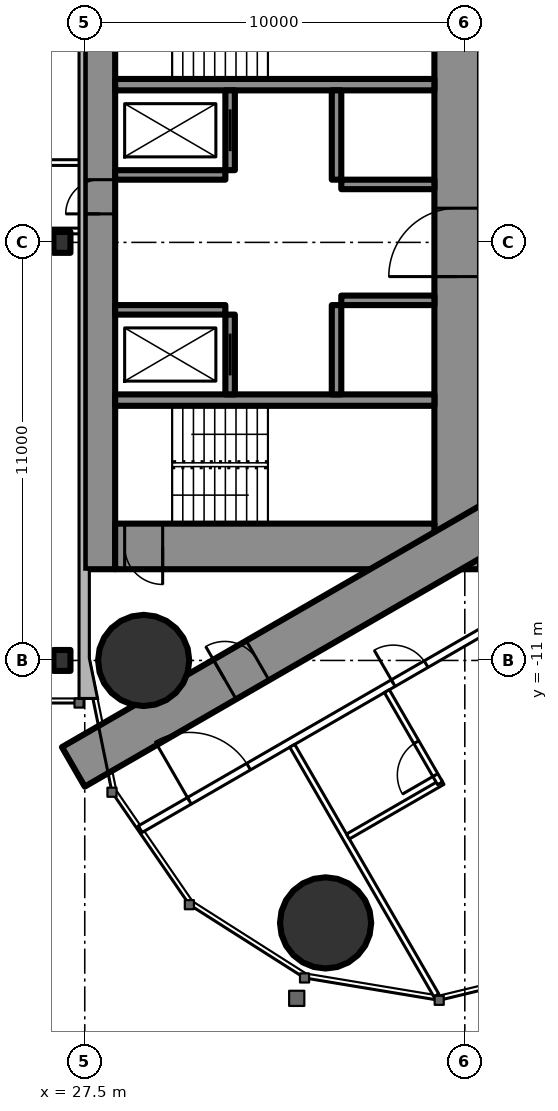
"""IFC4 building model, lengths in metres.
Left out: names, types, materials, properties, quantities, classifications, styles, units other than length and angle.
Written with IfcOpenShell. Run it as: python <this file> out.ifc"""

import sys

from ifc_helpers import new_model, si_unit, direction, frame, frame_2d, origin, origin_2d, place, context, subcontext, project, spatial, rectangle, circle, i_section, extrude, element, fill, save


model = new_model("IFC4")
c1 = context("Model", 3, precision=1e-05, world=origin(), true_north=direction((0.0, 1.0)))
c2 = subcontext(c1, "Body", "Model", "MODEL_VIEW")
j1 = project(units=[si_unit("LENGTHUNIT", "METRE"), si_unit("PLANEANGLEUNIT", "RADIAN")], contexts=[c1])
p1 = place(None, origin())
s1 = spatial("IfcSite", under=j1, at=p1, CompositionType="ELEMENT")
p2 = place(p1, origin())
s2 = spatial("IfcBuilding", under=s1, at=p2, CompositionType="ELEMENT")
p3 = place(p2, frame((0.0, 0.0, 240.5)))
s3 = spatial("IfcBuildingStorey", under=s2, at=p3, CompositionType="ELEMENT", Elevation=240.5)
for number, where, z_axis, x_axis in (
    (1, (33.837, -17.906, 0.0), (0.0, 0.0, 1.0), (1.0, 0.0, 0.0)),
    (2, (29.05, -11.0, 0.0), (0.0, 0.0, 1.0), (1.0, 0.0, 0.0)),
):
    element("IfcColumn", number, at=place(p3, frame(where, z_axis=z_axis, x_axis=x_axis)), inside=s3, PredefinedType="COLUMN", context=c2, shape_type="SweptSolid", body=[
        extrude(circle(Radius=1.2, at=origin_2d()), origin(), (0.0, 0.0, 1.0), 3.6),
    ])
p4 = place(p3, frame((27.9, -8.6, 0.0), z_axis=(0.0, 0.0, 1.0), x_axis=(0.0, 1.0, 0.0)))
e3 = element("IfcWall", 3, at=p4, inside=s3, PredefinedType="SHEAR", context=c2, shape_type="SweptSolid", body=[
    extrude(rectangle(XDim=17.2, YDim=0.8, at=frame_2d((8.6, 0.0))), origin(), (0.0, 0.0, 1.0), 3.6),
])
p5 = place(p4, frame((9.35, 0.0, 0.0)))
e4 = element("IfcOpeningElement", 4, at=p5, cuts=e3, PredefinedType="OPENING", context=c2, shape_type="SweptSolid", body=[
    extrude(rectangle(XDim=0.9, YDim=2.2, at=frame_2d((0.45, 1.1))), frame((0.0, 0.41, 0.0), z_axis=(0.0, -1.0, 0.0), x_axis=(1.0, 0.0, 0.0)), (0.0, 0.0, 1.0), 0.82),
])
p6 = place(p3, frame((37.3, -8.6, 0.0), z_axis=(0.0, 0.0, 1.0), x_axis=(0.0, 1.0, 0.0)))
e5 = element("IfcWall", 5, at=p6, inside=s3, PredefinedType="SHEAR", context=c2, shape_type="SweptSolid", body=[
    extrude(rectangle(XDim=17.2, YDim=1.2, at=frame_2d((8.6, 0.0))), origin(), (0.0, 0.0, 1.0), 3.6),
])
p7 = place(p6, frame((7.7, 0.0, 0.0)))
e6 = element("IfcOpeningElement", 6, at=p7, cuts=e5, PredefinedType="OPENING", context=c2, shape_type="SweptSolid", body=[
    extrude(rectangle(XDim=1.8, YDim=2.2, at=frame_2d((0.9, 1.1))), frame((0.0, 0.61, 0.0), z_axis=(0.0, -1.0, 0.0), x_axis=(1.0, 0.0, 0.0)), (0.0, 0.0, 1.0), 1.22),
])
p8 = place(p3, frame((28.3, -8.0, 0.0), z_axis=(0.0, 0.0, 1.0), x_axis=(1.0, 0.0, 0.0)))
e7 = element("IfcWall", 7, at=p8, inside=s3, PredefinedType="SHEAR", context=c2, shape_type="SweptSolid", body=[
    extrude(rectangle(XDim=8.4, YDim=1.2, at=frame_2d((4.2, 0.0))), origin(), (0.0, 0.0, 1.0), 3.6),
])
p9 = place(p8, frame((0.25, 0.0, 0.0)))
e8 = element("IfcOpeningElement", 8, at=p9, cuts=e7, PredefinedType="OPENING", context=c2, shape_type="SweptSolid", body=[
    extrude(rectangle(XDim=1.0, YDim=2.2, at=frame_2d((0.5, 1.1))), frame((0.0, 0.61, 0.0), z_axis=(0.0, -1.0, 0.0), x_axis=(1.0, 0.0, 0.0)), (0.0, 0.0, 1.0), 1.22),
])
for number, where, z_axis, x_axis in (
    (9, (28.3, -4.15, 0.0), (0.0, 0.0, 1.0), (1.0, 0.0, 0.0)),
    (10, (28.3, 4.15, 0.0), (0.0, 0.0, 1.0), (1.0, 0.0, 0.0)),
):
    element("IfcWall", number, at=place(p3, frame(where, z_axis=z_axis, x_axis=x_axis)), inside=s3, PredefinedType="SHEAR", context=c2, shape_type="SweptSolid", body=[
        extrude(rectangle(XDim=8.4, YDim=0.3, at=frame_2d((4.2, 0.0))), origin(), (0.0, 0.0, 1.0), 3.6),
    ])
p10 = place(p3, frame((31.325, -4.0, 0.0), z_axis=(0.0, 0.0, 1.0), x_axis=(0.0, 1.0, 0.0)))
e11 = element("IfcWall", 11, at=p10, inside=s3, PredefinedType="SHEAR", context=c2, shape_type="SweptSolid", body=[
    extrude(rectangle(XDim=2.1, YDim=0.25, at=frame_2d((1.05, 0.0))), origin(), (0.0, 0.0, 1.0), 3.6),
])
p11 = place(p10, frame((0.5, 0.0, 0.0)))
e12 = element("IfcOpeningElement", 12, at=p11, cuts=e11, PredefinedType="OPENING", context=c2, shape_type="SweptSolid", body=[
    extrude(rectangle(XDim=1.1, YDim=2.2, at=frame_2d((0.55, 1.1))), frame((0.0, 0.135, 0.0), z_axis=(0.0, -1.0, 0.0), x_axis=(1.0, 0.0, 0.0)), (0.0, 0.0, 1.0), 0.27),
])
p12 = place(p3, frame((34.125, -4.0, 0.0), z_axis=(0.0, 0.0, 1.0), x_axis=(0.0, 1.0, 0.0)))
e13 = element("IfcWall", 13, at=p12, inside=s3, PredefinedType="SHEAR", context=c2, shape_type="SweptSolid", body=[
    extrude(rectangle(XDim=2.35, YDim=0.25, at=frame_2d((1.175, 0.0))), origin(), (0.0, 0.0, 1.0), 3.6),
])
p13 = place(p3, frame((28.3, -1.775, 0.0), z_axis=(0.0, 0.0, 1.0), x_axis=(1.0, 0.0, 0.0)))
e14 = element("IfcWall", 14, at=p13, inside=s3, PredefinedType="SHEAR", context=c2, shape_type="SweptSolid", body=[
    extrude(rectangle(XDim=2.9, YDim=0.25, at=frame_2d((1.45, 0.0))), origin(), (0.0, 0.0, 1.0), 3.6),
])
p14 = place(p3, frame((34.25, -1.525, 0.0), z_axis=(0.0, 0.0, 1.0), x_axis=(1.0, 0.0, 0.0)))
e15 = element("IfcWall", 15, at=p14, inside=s3, PredefinedType="SHEAR", context=c2, shape_type="SweptSolid", body=[
    extrude(rectangle(XDim=2.45, YDim=0.25, at=frame_2d((1.225, 0.0))), origin(), (0.0, 0.0, 1.0), 3.6),
])
p15 = place(p3, frame((31.325, 1.9, 0.0), z_axis=(0.0, 0.0, 1.0), x_axis=(0.0, 1.0, 0.0)))
e16 = element("IfcWall", 16, at=p15, inside=s3, PredefinedType="SHEAR", context=c2, shape_type="SweptSolid", body=[
    extrude(rectangle(XDim=2.1, YDim=0.25, at=frame_2d((1.05, 0.0))), origin(), (0.0, 0.0, 1.0), 3.6),
])
p16 = place(p15, frame((0.5, 0.0, 0.0)))
e17 = element("IfcOpeningElement", 17, at=p16, cuts=e16, PredefinedType="OPENING", context=c2, shape_type="SweptSolid", body=[
    extrude(rectangle(XDim=1.1, YDim=2.2, at=frame_2d((0.55, 1.1))), frame((0.0, 0.135, 0.0), z_axis=(0.0, -1.0, 0.0), x_axis=(1.0, 0.0, 0.0)), (0.0, 0.0, 1.0), 0.27),
])
p17 = place(p3, frame((34.125, 1.65, 0.0), z_axis=(0.0, 0.0, 1.0), x_axis=(0.0, 1.0, 0.0)))
e18 = element("IfcWall", 18, at=p17, inside=s3, PredefinedType="SHEAR", context=c2, shape_type="SweptSolid", body=[
    extrude(rectangle(XDim=2.35, YDim=0.25, at=frame_2d((1.175, 0.0))), origin(), (0.0, 0.0, 1.0), 3.6),
])
p18 = place(p3, frame((28.3, 1.775, 0.0), z_axis=(0.0, 0.0, 1.0), x_axis=(1.0, 0.0, 0.0)))
e19 = element("IfcWall", 19, at=p18, inside=s3, PredefinedType="SHEAR", context=c2, shape_type="SweptSolid", body=[
    extrude(rectangle(XDim=2.9, YDim=0.25, at=frame_2d((1.45, 0.0))), origin(), (0.0, 0.0, 1.0), 3.6),
])
p19 = place(p3, frame((34.25, 1.525, 0.0), z_axis=(0.0, 0.0, 1.0), x_axis=(1.0, 0.0, 0.0)))
e20 = element("IfcWall", 20, at=p19, inside=s3, PredefinedType="SHEAR", context=c2, shape_type="SweptSolid", body=[
    extrude(rectangle(XDim=2.45, YDim=0.25, at=frame_2d((1.225, 0.0))), origin(), (0.0, 0.0, 1.0), 3.6),
])
p20 = place(p3, frame((27.2, -13.8, 0.0), z_axis=(0.0, 0.0, 1.0), x_axis=(0.866027159892, 0.499996958321, 0.0)))
e21 = element("IfcWall", 21, at=p20, inside=s3, PredefinedType="SHEAR", context=c2, shape_type="SweptSolid", body=[
    extrude(rectangle(XDim=27.947, YDim=1.2, at=frame_2d((13.973, 0.0))), origin(), (0.0, 0.0, 1.0), 3.6),
])
p21 = place(p20, frame((4.6, 0.0, 0.0)))
e22 = element("IfcOpeningElement", 22, at=p21, cuts=e21, PredefinedType="OPENING", context=c2, shape_type="SweptSolid", body=[
    extrude(rectangle(XDim=1.0, YDim=2.2, at=frame_2d((0.5, 1.1))), frame((0.0, 0.61, 0.0), z_axis=(0.0, -1.0, 0.0), x_axis=(1.0, 0.0, 0.0)), (0.0, 0.0, 1.0), 1.22),
])
p22 = place(p20, frame((13.395, 0.0, 0.0)))
e23 = element("IfcOpeningElement", 23, at=p22, cuts=e21, PredefinedType="OPENING", context=c2, shape_type="SweptSolid", body=[
    extrude(rectangle(XDim=1.8, YDim=2.2, at=frame_2d((0.9, 1.1))), frame((0.0, 0.61, 0.0), z_axis=(0.0, -1.0, 0.0), x_axis=(1.0, 0.0, 0.0)), (0.0, 0.0, 1.0), 1.22),
])
p23 = place(p3, frame((27.2, 13.8, 0.0), z_axis=(0.0, 0.0, 1.0), x_axis=(0.866024515034, -0.500001539357, 0.0)))
e24 = element("IfcWall", 24, at=p23, inside=s3, PredefinedType="SHEAR", context=c2, shape_type="SweptSolid", body=[
    extrude(rectangle(XDim=26.907, YDim=1.2, at=frame_2d((13.454, 0.0))), origin(), (0.0, 0.0, 1.0), 3.6),
])
p24 = place(p23, frame((4.6, 0.0, 0.0)))
e25 = element("IfcOpeningElement", 25, at=p24, cuts=e24, PredefinedType="OPENING", context=c2, shape_type="SweptSolid", body=[
    extrude(rectangle(XDim=1.0, YDim=2.2, at=frame_2d((0.5, 1.1))), frame((0.0, 0.61, 0.0), z_axis=(0.0, -1.0, 0.0), x_axis=(1.0, 0.0, 0.0)), (0.0, 0.0, 1.0), 1.22),
])
p25 = place(p23, frame((13.395, 0.0, 0.0)))
e26 = element("IfcOpeningElement", 26, at=p25, cuts=e24, PredefinedType="OPENING", context=c2, shape_type="SweptSolid", body=[
    extrude(rectangle(XDim=1.8, YDim=2.2, at=frame_2d((0.9, 1.1))), frame((0.0, 0.61, 0.0), z_axis=(0.0, -1.0, 0.0), x_axis=(1.0, 0.0, 0.0)), (0.0, 0.0, 1.0), 1.22),
])
for number, where, z_axis, x_axis in (
    (27, (26.9, -11.0, 0.0), (0.0, 0.0, 1.0), (1.0, 0.0, 0.0)),
    (28, (26.9, 0.0, 0.0), (0.0, 0.0, 1.0), (1.0, 0.0, 0.0)),
):
    element("IfcColumn", number, at=place(p3, frame(where, z_axis=z_axis, x_axis=x_axis)), inside=s3, PredefinedType="COLUMN", context=c2, shape_type="SweptSolid", body=[
        extrude(i_section(OverallWidth=0.448, OverallDepth=0.55, WebThickness=0.072, FlangeThickness=0.115, FilletRadius=0.02, at=origin_2d()), origin(), (0.0, 0.0, 1.0), 3.6),
    ])
p26 = place(p3, frame((28.959, -15.44, 0.0), z_axis=(0.0, 0.0, 1.0), x_axis=(0.866025227435, 0.500000305447, 0.0)))
e29 = element("IfcWall", 29, at=p26, inside=s3, PredefinedType="PARTITIONING", context=c2, shape_type="SweptSolid", body=[
    extrude(rectangle(XDim=30.88, YDim=0.2, at=frame_2d((15.44, 0.0))), origin(), (0.0, 0.0, 1.0), 3.35),
])
p27 = place(p26, frame((1.494, 0.0, 0.0)))
e30 = element("IfcOpeningElement", 30, at=p27, cuts=e29, PredefinedType="OPENING", context=c2, shape_type="SweptSolid", body=[
    extrude(rectangle(XDim=1.8, YDim=2.03, at=frame_2d((0.9, 1.015))), frame((0.0, 0.11, 0.0), z_axis=(0.0, -1.0, 0.0), x_axis=(1.0, 0.0, 0.0)), (0.0, 0.0, 1.0), 0.22),
])
p28 = place(p26, frame((7.687, 0.0, 0.0)))
e31 = element("IfcOpeningElement", 31, at=p28, cuts=e29, PredefinedType="OPENING", context=c2, shape_type="SweptSolid", body=[
    extrude(rectangle(XDim=1.0, YDim=2.2, at=frame_2d((0.5, 1.1))), frame((0.0, 0.11, 0.0), z_axis=(0.0, -1.0, 0.0), x_axis=(1.0, 0.0, 0.0)), (0.0, 0.0, 1.0), 0.22),
])
p29 = place(p26, frame((16.137, 0.0, 0.0)))
e32 = element("IfcOpeningElement", 32, at=p29, cuts=e29, PredefinedType="OPENING", context=c2, shape_type="SweptSolid", body=[
    extrude(rectangle(XDim=0.95, YDim=2.2, at=frame_2d((0.475, 1.1))), frame((0.0, 0.11, 0.0), z_axis=(0.0, -1.0, 0.0), x_axis=(1.0, 0.0, 0.0)), (0.0, 0.0, 1.0), 0.22),
])
p30 = place(p26, frame((20.021, 0.0, 0.0)))
e33 = element("IfcOpeningElement", 33, at=p30, cuts=e29, PredefinedType="OPENING", context=c2, shape_type="SweptSolid", body=[
    extrude(rectangle(XDim=0.95, YDim=2.2, at=frame_2d((0.475, 1.1))), frame((0.0, 0.11, 0.0), z_axis=(0.0, -1.0, 0.0), x_axis=(1.0, 0.0, 0.0)), (0.0, 0.0, 1.0), 0.22),
])
p31 = place(p26, frame((26.253, 0.0, 0.0)))
e34 = element("IfcOpeningElement", 34, at=p31, cuts=e29, PredefinedType="OPENING", context=c2, shape_type="SweptSolid", body=[
    extrude(rectangle(XDim=0.95, YDim=2.2, at=frame_2d((0.475, 1.1))), frame((0.0, 0.11, 0.0), z_axis=(0.0, -1.0, 0.0), x_axis=(1.0, 0.0, 0.0)), (0.0, 0.0, 1.0), 0.22),
])
p32 = place(p3, frame((32.96, -13.246, 0.0), z_axis=(0.0, 0.0, 1.0), x_axis=(0.500000236886, -0.866025267018, 0.0)))
e35 = element("IfcWall", 35, at=p32, inside=s3, PredefinedType="PARTITIONING", context=c2, shape_type="SweptSolid", body=[
    extrude(rectangle(XDim=7.583, YDim=0.15, at=frame_2d((3.791, 0.0))), origin(), (0.0, 0.0, 1.0), 3.35),
])
p33 = place(p3, frame((34.425, -15.633, 0.0), z_axis=(0.0, 0.0, 1.0), x_axis=(0.866018712932, 0.500011588718, 0.0)))
e36 = element("IfcWall", 36, at=p33, inside=s3, PredefinedType="PARTITIONING", context=c2, shape_type="SweptSolid", body=[
    extrude(rectangle(XDim=2.875, YDim=0.15, at=frame_2d((1.438, 0.0))), origin(), (0.0, 0.0, 1.0), 3.35),
])
p34 = place(p3, frame((35.45, -11.808, 0.0), z_axis=(0.0, 0.0, 1.0), x_axis=(0.49994636267, -0.866056369097, 0.0)))
e37 = element("IfcWall", 37, at=p34, inside=s3, PredefinedType="PARTITIONING", context=c2, shape_type="SweptSolid", body=[
    extrude(rectangle(XDim=2.8, YDim=0.15, at=frame_2d((1.4, 0.0))), origin(), (0.0, 0.0, 1.0), 3.35),
])
p35 = place(p34, frame((1.55, 0.0, 0.0)))
e38 = element("IfcOpeningElement", 38, at=p35, cuts=e37, PredefinedType="OPENING", context=c2, shape_type="SweptSolid", body=[
    extrude(rectangle(XDim=1.0, YDim=2.2, at=frame_2d((0.5, 1.1))), frame((0.0, 0.085, 0.0), z_axis=(0.0, -1.0, 0.0), x_axis=(1.0, 0.0, 0.0)), (0.0, 0.0, 1.0), 0.17),
])
p36 = place(p3, frame((-27.5, 0.3, 0.0), z_axis=(0.0, 0.0, 1.0), x_axis=(1.0, 0.0, 0.0)))
e39 = element("IfcWall", 39, at=p36, inside=s3, PredefinedType="PARTITIONING", context=c2, shape_type="SweptSolid", body=[
    extrude(rectangle(XDim=55.0, YDim=0.15, at=frame_2d((27.5, 0.0))), origin(), (0.0, 0.0, 1.0), 2.4),
])
p37 = place(p36, frame((1.575, 0.0, 0.0)))
e40 = element("IfcOpeningElement", 40, at=p37, cuts=e39, PredefinedType="OPENING", context=c2, shape_type="SweptSolid", body=[
    extrude(rectangle(XDim=1.0, YDim=2.2, at=frame_2d((0.5, 1.1))), frame((0.0, 0.085, 0.0), z_axis=(0.0, -1.0, 0.0), x_axis=(1.0, 0.0, 0.0)), (0.0, 0.0, 1.0), 0.17),
])
p38 = place(p36, frame((8.525, 0.0, 0.0)))
e41 = element("IfcOpeningElement", 41, at=p38, cuts=e39, PredefinedType="OPENING", context=c2, shape_type="SweptSolid", body=[
    extrude(rectangle(XDim=1.05, YDim=2.4, at=frame_2d((0.525, 1.2))), frame((0.0, 0.085, 0.0), z_axis=(0.0, -1.0, 0.0), x_axis=(1.0, 0.0, 0.0)), (0.0, 0.0, 1.0), 0.17),
])
p39 = place(p36, frame((14.025, 0.0, 0.0)))
e42 = element("IfcOpeningElement", 42, at=p39, cuts=e39, PredefinedType="OPENING", context=c2, shape_type="SweptSolid", body=[
    extrude(rectangle(XDim=1.05, YDim=2.4, at=frame_2d((0.525, 1.2))), frame((0.0, 0.085, 0.0), z_axis=(0.0, -1.0, 0.0), x_axis=(1.0, 0.0, 0.0)), (0.0, 0.0, 1.0), 0.17),
])
p40 = place(p36, frame((25.025, 0.0, 0.0)))
e43 = element("IfcOpeningElement", 43, at=p40, cuts=e39, PredefinedType="OPENING", context=c2, shape_type="SweptSolid", body=[
    extrude(rectangle(XDim=1.05, YDim=2.4, at=frame_2d((0.525, 1.2))), frame((0.0, 0.085, 0.0), z_axis=(0.0, -1.0, 0.0), x_axis=(1.0, 0.0, 0.0)), (0.0, 0.0, 1.0), 0.17),
])
p41 = place(p36, frame((30.525, 0.0, 0.0)))
e44 = element("IfcOpeningElement", 44, at=p41, cuts=e39, PredefinedType="OPENING", context=c2, shape_type="SweptSolid", body=[
    extrude(rectangle(XDim=1.05, YDim=2.4, at=frame_2d((0.525, 1.2))), frame((0.0, 0.085, 0.0), z_axis=(0.0, -1.0, 0.0), x_axis=(1.0, 0.0, 0.0)), (0.0, 0.0, 1.0), 0.17),
])
p42 = place(p36, frame((41.525, 0.0, 0.0)))
e45 = element("IfcOpeningElement", 45, at=p42, cuts=e39, PredefinedType="OPENING", context=c2, shape_type="SweptSolid", body=[
    extrude(rectangle(XDim=1.05, YDim=2.4, at=frame_2d((0.525, 1.2))), frame((0.0, 0.085, 0.0), z_axis=(0.0, -1.0, 0.0), x_axis=(1.0, 0.0, 0.0)), (0.0, 0.0, 1.0), 0.17),
])
p43 = place(p36, frame((47.025, 0.0, 0.0)))
e46 = element("IfcOpeningElement", 46, at=p43, cuts=e39, PredefinedType="OPENING", context=c2, shape_type="SweptSolid", body=[
    extrude(rectangle(XDim=1.05, YDim=2.4, at=frame_2d((0.525, 1.2))), frame((0.0, 0.085, 0.0), z_axis=(0.0, -1.0, 0.0), x_axis=(1.0, 0.0, 0.0)), (0.0, 0.0, 1.0), 0.17),
])
p44 = place(p36, frame((52.525, 0.0, 0.0)))
e47 = element("IfcOpeningElement", 47, at=p44, cuts=e39, PredefinedType="OPENING", context=c2, shape_type="SweptSolid", body=[
    extrude(rectangle(XDim=1.05, YDim=2.4, at=frame_2d((0.525, 1.2))), frame((0.0, 0.085, 0.0), z_axis=(0.0, -1.0, 0.0), x_axis=(1.0, 0.0, 0.0)), (0.0, 0.0, 1.0), 0.17),
])
p45 = place(p3, frame((-10.65, 2.1, 0.0), z_axis=(0.0, 0.0, 1.0), x_axis=(1.0, 0.0, 0.0)))
e48 = element("IfcWall", 48, at=p45, inside=s3, PredefinedType="PARTITIONING", context=c2, shape_type="SweptSolid", body=[
    extrude(rectangle(XDim=38.15, YDim=0.15, at=frame_2d((19.075, 0.0))), origin(), (0.0, 0.0, 1.0), 3.4),
])
p46 = place(p45, frame((2.675, 0.0, 0.0)))
e49 = element("IfcOpeningElement", 49, at=p46, cuts=e48, PredefinedType="OPENING", context=c2, shape_type="SweptSolid", body=[
    extrude(rectangle(XDim=1.05, YDim=2.4, at=frame_2d((0.525, 1.2))), frame((0.0, 0.085, 0.0), z_axis=(0.0, -1.0, 0.0), x_axis=(1.0, 0.0, 0.0)), (0.0, 0.0, 1.0), 0.17),
])
p47 = place(p45, frame((13.675, 0.0, 0.0)))
e50 = element("IfcOpeningElement", 50, at=p47, cuts=e48, PredefinedType="OPENING", context=c2, shape_type="SweptSolid", body=[
    extrude(rectangle(XDim=1.05, YDim=2.4, at=frame_2d((0.525, 1.2))), frame((0.0, 0.085, 0.0), z_axis=(0.0, -1.0, 0.0), x_axis=(1.0, 0.0, 0.0)), (0.0, 0.0, 1.0), 0.17),
])
p48 = place(p45, frame((24.675, 0.0, 0.0)))
e51 = element("IfcOpeningElement", 51, at=p48, cuts=e48, PredefinedType="OPENING", context=c2, shape_type="SweptSolid", body=[
    extrude(rectangle(XDim=1.05, YDim=2.4, at=frame_2d((0.525, 1.2))), frame((0.0, 0.085, 0.0), z_axis=(0.0, -1.0, 0.0), x_axis=(1.0, 0.0, 0.0)), (0.0, 0.0, 1.0), 0.17),
])
p49 = place(p45, frame((30.175, 0.0, 0.0)))
e52 = element("IfcOpeningElement", 52, at=p49, cuts=e48, PredefinedType="OPENING", context=c2, shape_type="SweptSolid", body=[
    extrude(rectangle(XDim=1.05, YDim=2.4, at=frame_2d((0.525, 1.2))), frame((0.0, 0.085, 0.0), z_axis=(0.0, -1.0, 0.0), x_axis=(1.0, 0.0, 0.0)), (0.0, 0.0, 1.0), 0.17),
])
p50 = place(p45, frame((35.675, 0.0, 0.0)))
e53 = element("IfcOpeningElement", 53, at=p50, cuts=e48, PredefinedType="OPENING", context=c2, shape_type="SweptSolid", body=[
    extrude(rectangle(XDim=1.05, YDim=2.4, at=frame_2d((0.525, 1.2))), frame((0.0, 0.085, 0.0), z_axis=(0.0, -1.0, 0.0), x_axis=(1.0, 0.0, 0.0)), (0.0, 0.0, 1.0), 0.17),
])
p51 = place(p27, origin())
e54 = element("IfcDoor", 54, at=p51, inside=s3, OperationType="DOUBLE_DOOR_SINGLE_SWING", PredefinedType="DOOR", context=c2, shape_type="SweptSolid", body=[
    extrude(rectangle(XDim=1.8, YDim=2.03, at=frame_2d((0.9, 1.015))), frame((0.0, 0.025, 0.0), z_axis=(0.0, -1.0, 0.0), x_axis=(1.0, 0.0, 0.0)), (0.0, 0.0, 1.0), 0.05),
])
fill(e30, e54)
p52 = place(p35, origin())
e55 = element("IfcDoor", 55, at=p52, inside=s3, OperationType="SINGLE_SWING_RIGHT", PredefinedType="DOOR", context=c2, shape_type="SweptSolid", body=[
    extrude(rectangle(XDim=1.0, YDim=2.2, at=frame_2d((0.5, 1.1))), frame((0.0, 0.025, 0.0), z_axis=(0.0, -1.0, 0.0), x_axis=(1.0, 0.0, 0.0)), (0.0, 0.0, 1.0), 0.05),
])
fill(e38, e55)
p53 = place(p28, origin())
e56 = element("IfcDoor", 56, at=p53, inside=s3, OperationType="SINGLE_SWING_LEFT", PredefinedType="DOOR", context=c2, shape_type="SweptSolid", body=[
    extrude(rectangle(XDim=1.0, YDim=2.2, at=frame_2d((0.5, 1.1))), frame((0.0, 0.025, 0.0), z_axis=(0.0, -1.0, 0.0), x_axis=(1.0, 0.0, 0.0)), (0.0, 0.0, 1.0), 0.05),
])
fill(e31, e56)
p54 = place(p21, origin())
e57 = element("IfcDoor", 57, at=p54, inside=s3, OperationType="SINGLE_SWING_LEFT", PredefinedType="DOOR", context=c2, shape_type="SweptSolid", body=[
    extrude(rectangle(XDim=1.0, YDim=2.2, at=frame_2d((0.5, 1.1))), frame((0.0, 0.025, 0.0), z_axis=(0.0, -1.0, 0.0), x_axis=(1.0, 0.0, 0.0)), (0.0, 0.0, 1.0), 0.05),
])
fill(e22, e57)
p55 = place(p7, origin())
e58 = element("IfcDoor", 58, at=p55, inside=s3, OperationType="DOUBLE_DOOR_SINGLE_SWING", PredefinedType="DOOR", context=c2, shape_type="SweptSolid", body=[
    extrude(rectangle(XDim=1.8, YDim=2.2, at=frame_2d((0.9, 1.1))), frame((0.0, 0.025, 0.0), z_axis=(0.0, -1.0, 0.0), x_axis=(1.0, 0.0, 0.0)), (0.0, 0.0, 1.0), 0.05),
])
fill(e6, e58)
p56 = place(p9, origin())
e59 = element("IfcDoor", 59, at=p56, inside=s3, OperationType="SINGLE_SWING_RIGHT", PredefinedType="DOOR", context=c2, shape_type="SweptSolid", body=[
    extrude(rectangle(XDim=1.0, YDim=2.2, at=frame_2d((0.5, 1.1))), frame((0.0, 0.025, 0.0), z_axis=(0.0, -1.0, 0.0), x_axis=(1.0, 0.0, 0.0)), (0.0, 0.0, 1.0), 0.05),
])
fill(e8, e59)
p57 = place(p5, origin())
e60 = element("IfcDoor", 60, at=p57, inside=s3, OperationType="SINGLE_SWING_LEFT", PredefinedType="DOOR", context=c2, shape_type="SweptSolid", body=[
    extrude(rectangle(XDim=0.9, YDim=2.2, at=frame_2d((0.45, 1.1))), frame((0.0, 0.025, 0.0), z_axis=(0.0, -1.0, 0.0), x_axis=(1.0, 0.0, 0.0)), (0.0, 0.0, 1.0), 0.05),
])
fill(e4, e60)
p58 = place(p11, origin())
e61 = element("IfcDoor", 61, at=p58, inside=s3, OperationType="SLIDING_TO_LEFT", PredefinedType="USERDEFINED", context=c2, shape_type="SweptSolid", body=[
    extrude(rectangle(XDim=1.1, YDim=2.2, at=frame_2d((0.55, 1.1))), frame((0.0, 0.025, 0.0), z_axis=(0.0, -1.0, 0.0), x_axis=(1.0, 0.0, 0.0)), (0.0, 0.0, 1.0), 0.05),
])
fill(e12, e61)
p59 = place(p16, origin())
e62 = element("IfcDoor", 62, at=p59, inside=s3, OperationType="SLIDING_TO_LEFT", PredefinedType="USERDEFINED", context=c2, shape_type="SweptSolid", body=[
    extrude(rectangle(XDim=1.1, YDim=2.2, at=frame_2d((0.55, 1.1))), frame((0.0, 0.025, 0.0), z_axis=(0.0, -1.0, 0.0), x_axis=(1.0, 0.0, 0.0)), (0.0, 0.0, 1.0), 0.05),
])
fill(e17, e62)
save(model, sys.argv[1])
